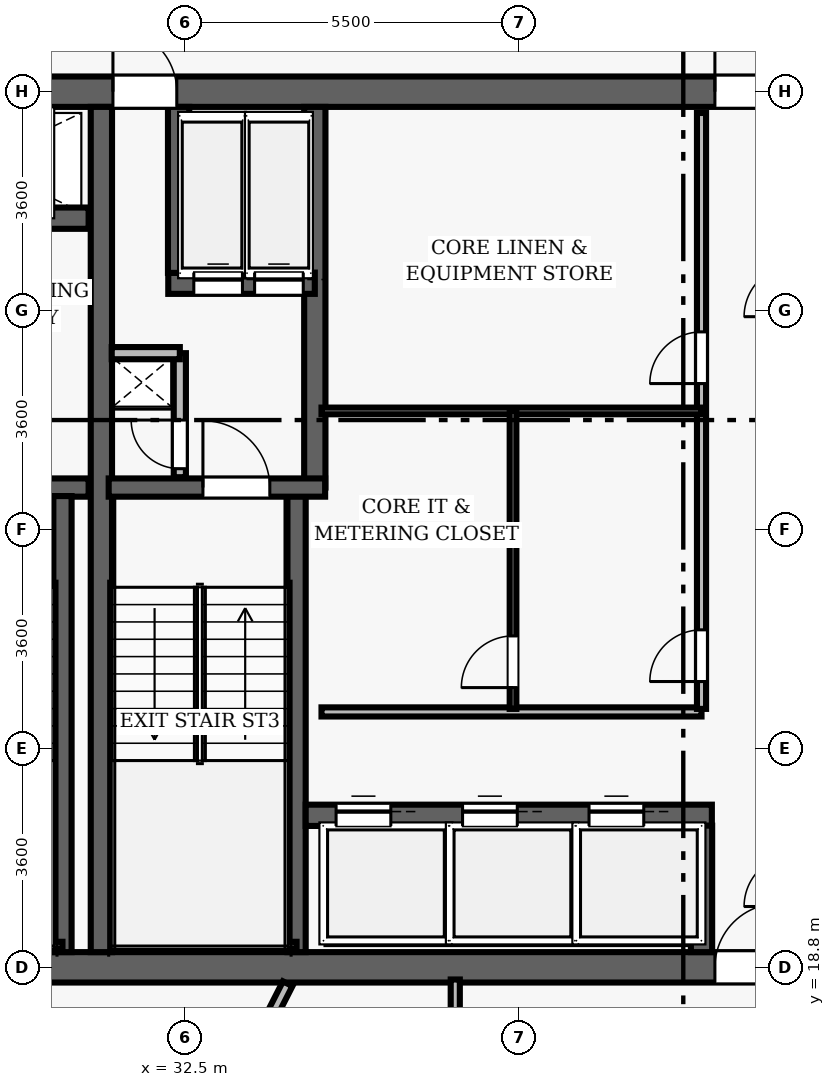
"""IFC4 building model, lengths in metres.
Left out: names, types, materials, properties, quantities, classifications, styles, units other than length and angle.
Written with IfcOpenShell. Run it as: python <this file> out.ifc"""

import sys

from ifc_helpers import new_model, si_unit, direction, frame, frame_2d, origin, place, context, subcontext, project, spatial, rectangle, extrude, element, fill, save


model = new_model("IFC4")
c1 = context("Model", 3, precision=1e-05, world=origin(), true_north=direction((0.0, 1.0)))
c2 = subcontext(c1, "Body", "Model", "MODEL_VIEW")
j1 = project(units=[si_unit("LENGTHUNIT", "METRE"), si_unit("PLANEANGLEUNIT", "RADIAN")], contexts=[c1])
p1 = place(None, origin())
s1 = spatial("IfcSite", under=j1, at=p1, CompositionType="ELEMENT")
p2 = place(p1, origin())
s2 = spatial("IfcBuilding", under=s1, at=p2, CompositionType="ELEMENT")
p3 = place(p2, frame((0.0, 0.0, 171.2)))
s3 = spatial("IfcBuildingStorey", under=s2, at=p3, CompositionType="ELEMENT", Elevation=171.2)
p4 = place(p3, frame((26.75, 18.8, 0.0), z_axis=(0.0, 0.0, 1.0), x_axis=(1.0, 0.0, 0.0)))
e1 = element("IfcWall", 1, at=p4, inside=s3, PredefinedType="SHEAR", context=c2, shape_type="SweptSolid", body=[
    extrude(rectangle(XDim=22.5, YDim=0.5, at=frame_2d((11.25, 0.0))), origin(), (0.0, 0.0, 1.0), 3.85),
])
p5 = place(p4, frame((14.47, 0.0, 0.0)))
e2 = element("IfcOpeningElement", 2, at=p5, cuts=e1, PredefinedType="OPENING", context=c2, shape_type="SweptSolid", body=[
    extrude(rectangle(XDim=1.05, YDim=2.15, at=frame_2d((0.525, 1.075))), frame((0.0, 0.26, 0.0), z_axis=(0.0, -1.0, 0.0), x_axis=(1.0, 0.0, 0.0)), (0.0, 0.0, 1.0), 0.52),
])
p6 = place(p3, frame((26.75, 33.2, 0.0), z_axis=(0.0, 0.0, 1.0), x_axis=(1.0, 0.0, 0.0)))
e3 = element("IfcWall", 3, at=p6, inside=s3, PredefinedType="SHEAR", context=c2, shape_type="SweptSolid", body=[
    extrude(rectangle(XDim=22.5, YDim=0.5, at=frame_2d((11.25, 0.0))), origin(), (0.0, 0.0, 1.0), 3.85),
])
p7 = place(p6, frame((4.57, 0.0, 0.0)))
e4 = element("IfcOpeningElement", 4, at=p7, cuts=e3, PredefinedType="OPENING", context=c2, shape_type="SweptSolid", body=[
    extrude(rectangle(XDim=1.05, YDim=2.15, at=frame_2d((0.525, 1.075))), frame((0.0, 0.26, 0.0), z_axis=(0.0, -1.0, 0.0), x_axis=(1.0, 0.0, 0.0)), (0.0, 0.0, 1.0), 0.52),
])
p8 = place(p6, frame((14.47, 0.0, 0.0)))
e5 = element("IfcOpeningElement", 5, at=p8, cuts=e3, PredefinedType="OPENING", context=c2, shape_type="SweptSolid", body=[
    extrude(rectangle(XDim=1.05, YDim=2.15, at=frame_2d((0.525, 1.075))), frame((0.0, 0.26, 0.0), z_axis=(0.0, -1.0, 0.0), x_axis=(1.0, 0.0, 0.0)), (0.0, 0.0, 1.0), 0.52),
])
p9 = place(p3, frame((31.13, 19.05, 0.0), z_axis=(0.0, 0.0, 1.0), x_axis=(0.0, 1.0, 0.0)))
e6 = element("IfcWall", 6, at=p9, inside=s3, PredefinedType="SHEAR", context=c2, shape_type="SweptSolid", body=[
    extrude(rectangle(XDim=13.9, YDim=0.35, at=frame_2d((6.95, 0.0))), origin(), (0.0, 0.0, 1.0), 3.85),
])
p10 = place(p3, frame((27.25, 26.69, 0.0), z_axis=(0.0, 0.0, 1.0), x_axis=(1.0, 0.0, 0.0)))
e7 = element("IfcWall", 7, at=p10, inside=s3, PredefinedType="SHEAR", context=c2, shape_type="SweptSolid", body=[
    extrude(rectangle(XDim=3.67, YDim=0.3, at=frame_2d((1.835, 0.0))), origin(), (0.0, 0.0, 1.0), 3.85),
])
p11 = place(p10, frame((1.05, 0.0, 0.0)))
e8 = element("IfcOpeningElement", 8, at=p11, cuts=e7, PredefinedType="OPENING", context=c2, shape_type="SweptSolid", body=[
    extrude(rectangle(XDim=1.1, YDim=2.15, at=frame_2d((0.55, 1.075))), frame((0.0, 0.16, 0.0), z_axis=(0.0, -1.0, 0.0), x_axis=(1.0, 0.0, 0.0)), (0.0, 0.0, 1.0), 0.32),
])
p12 = place(p3, frame((30.49, 19.05, 0.0), z_axis=(0.0, 0.0, 1.0), x_axis=(0.0, 1.0, 0.0)))
e9 = element("IfcWall", 9, at=p12, inside=s3, PredefinedType="SHEAR", context=c2, shape_type="SweptSolid", body=[
    extrude(rectangle(XDim=7.5, YDim=0.3, at=frame_2d((3.75, 0.0))), origin(), (0.0, 0.0, 1.0), 3.85),
])
p13 = place(p3, frame((27.395, 19.16, 0.0), z_axis=(0.0, 0.0, 1.0), x_axis=(1.0, 0.0, 0.0)))
e10 = element("IfcWall", 10, at=p13, inside=s3, PredefinedType="SHEAR", context=c2, shape_type="SweptSolid", body=[
    extrude(rectangle(XDim=3.095, YDim=0.12, at=frame_2d((1.547, 0.0))), origin(), (0.0, 0.0, 1.0), 3.85),
])
p14 = place(p3, frame((27.25, 31.12, 0.0), z_axis=(0.0, 0.0, 1.0), x_axis=(1.0, 0.0, 0.0)))
e11 = element("IfcWall", 11, at=p14, inside=s3, PredefinedType="SHEAR", context=c2, shape_type="SweptSolid", body=[
    extrude(rectangle(XDim=3.67, YDim=0.35, at=frame_2d((1.835, 0.0))), origin(), (0.0, 0.0, 1.0), 3.035),
])
p15 = place(p14, frame((1.25, 0.0, 0.0)))
e12 = element("IfcOpeningElement", 12, at=p15, cuts=e11, PredefinedType="OPENING", context=c2, shape_type="SweptSolid", body=[
    extrude(rectangle(XDim=1.1, YDim=2.15, at=frame_2d((0.55, 1.075))), frame((0.0, 0.185, 0.0), z_axis=(0.0, -1.0, 0.0), x_axis=(1.0, 0.0, 0.0)), (0.0, 0.0, 1.0), 0.37),
])
p16 = place(p3, frame((34.34, 19.05, 0.0), z_axis=(0.0, 0.0, 1.0), x_axis=(0.0, 1.0, 0.0)))
e13 = element("IfcWall", 13, at=p16, inside=s3, PredefinedType="SHEAR", context=c2, shape_type="SweptSolid", body=[
    extrude(rectangle(XDim=7.5, YDim=0.3, at=frame_2d((3.75, 0.0))), origin(), (0.0, 0.0, 1.0), 3.85),
])
p17 = place(p3, frame((34.64, 26.69, 0.0), z_axis=(0.0, 0.0, 1.0), x_axis=(0.0, 1.0, 0.0)))
e14 = element("IfcWall", 14, at=p17, inside=s3, PredefinedType="SHEAR", context=c2, shape_type="SweptSolid", body=[
    extrude(rectangle(XDim=6.26, YDim=0.35, at=frame_2d((3.13, 0.0))), origin(), (0.0, 0.0, 1.0), 3.85),
])
p18 = place(p3, frame((31.25, 26.69, 0.0), z_axis=(0.0, 0.0, 1.0), x_axis=(1.0, 0.0, 0.0)))
e15 = element("IfcWall", 15, at=p18, inside=s3, PredefinedType="SHEAR", context=c2, shape_type="SweptSolid", body=[
    extrude(rectangle(XDim=3.56, YDim=0.3, at=frame_2d((1.78, 0.0))), origin(), (0.0, 0.0, 1.0), 3.85),
])
p19 = place(p18, frame((1.55, 0.0, 0.0)))
e16 = element("IfcOpeningElement", 16, at=p19, cuts=e15, PredefinedType="OPENING", context=c2, shape_type="SweptSolid", body=[
    extrude(rectangle(XDim=1.1, YDim=2.15, at=frame_2d((0.55, 1.075))), frame((0.0, 0.16, 0.0), z_axis=(0.0, -1.0, 0.0), x_axis=(1.0, 0.0, 0.0)), (0.0, 0.0, 1.0), 0.32),
])
p20 = place(p3, frame((31.3, 19.16, 0.0), z_axis=(0.0, 0.0, 1.0), x_axis=(1.0, 0.0, 0.0)))
e17 = element("IfcWall", 17, at=p20, inside=s3, PredefinedType="SHEAR", context=c2, shape_type="SweptSolid", body=[
    extrude(rectangle(XDim=3.04, YDim=0.12, at=frame_2d((1.52, 0.0))), origin(), (0.0, 0.0, 1.0), 3.85),
])
p21 = place(p3, frame((32.23, 30.05, 0.0), z_axis=(0.0, 0.0, 1.0), x_axis=(1.0, 0.0, 0.0)))
e18 = element("IfcWall", 18, at=p21, inside=s3, PredefinedType="SHEAR", context=c2, shape_type="SweptSolid", body=[
    extrude(rectangle(XDim=2.41, YDim=0.35, at=frame_2d((1.205, 0.0))), origin(), (0.0, 0.0, 1.0), 3.035),
])
p22 = place(p21, frame((0.42, 0.0, 0.0)))
e19 = element("IfcOpeningElement", 19, at=p22, cuts=e18, PredefinedType="OPENING", context=c2, shape_type="SweptSolid", body=[
    extrude(rectangle(XDim=0.8, YDim=2.15, at=frame_2d((0.4, 1.075))), frame((0.0, 0.185, 0.0), z_axis=(0.0, -1.0, 0.0), x_axis=(1.0, 0.0, 0.0)), (0.0, 0.0, 1.0), 0.37),
])
p23 = place(p21, frame((1.42, 0.0, 0.0)))
e20 = element("IfcOpeningElement", 20, at=p23, cuts=e18, PredefinedType="OPENING", context=c2, shape_type="SweptSolid", body=[
    extrude(rectangle(XDim=0.8, YDim=2.15, at=frame_2d((0.4, 1.075))), frame((0.0, 0.185, 0.0), z_axis=(0.0, -1.0, 0.0), x_axis=(1.0, 0.0, 0.0)), (0.0, 0.0, 1.0), 0.37),
])
p24 = place(p3, frame((32.4, 30.22, 0.0), z_axis=(0.0, 0.0, 1.0), x_axis=(0.0, 1.0, 0.0)))
e21 = element("IfcWall", 21, at=p24, inside=s3, PredefinedType="SHEAR", context=c2, shape_type="SweptSolid", body=[
    extrude(rectangle(XDim=2.73, YDim=0.35, at=frame_2d((1.365, 0.0))), origin(), (0.0, 0.0, 1.0), 3.035),
])
p25 = place(p3, frame((32.42, 26.86, 0.0), z_axis=(0.0, 0.0, 1.0), x_axis=(0.0, 1.0, 0.0)))
e22 = element("IfcWall", 22, at=p25, inside=s3, PredefinedType="PARTITIONING", context=c2, shape_type="SweptSolid", body=[
    extrude(rectangle(XDim=2.04, YDim=0.2, at=frame_2d((1.02, 0.0))), origin(), (0.0, 0.0, 1.0), 3.035),
])
p26 = place(p25, frame((0.14, 0.0, 0.0)))
e23 = element("IfcOpeningElement", 23, at=p26, cuts=e22, PredefinedType="OPENING", context=c2, shape_type="SweptSolid", body=[
    extrude(rectangle(XDim=0.8, YDim=2.05, at=frame_2d((0.4, 1.025))), frame((0.0, 0.11, 0.0), z_axis=(0.0, -1.0, 0.0), x_axis=(1.0, 0.0, 0.0)), (0.0, 0.0, 1.0), 0.22),
])
p27 = place(p3, frame((31.3, 28.9, 0.0), z_axis=(0.0, 0.0, 1.0), x_axis=(1.0, 0.0, 0.0)))
e24 = element("IfcWall", 24, at=p27, inside=s3, PredefinedType="PARTITIONING", context=c2, shape_type="SweptSolid", body=[
    extrude(rectangle(XDim=1.12, YDim=0.2, at=frame_2d((0.56, 0.0))), origin(), (0.0, 0.0, 1.0), 3.035),
])
p28 = place(p3, frame((34.49, 21.3, 0.0), z_axis=(0.0, 0.0, 1.0), x_axis=(1.0, 0.0, 0.0)))
e25 = element("IfcWall", 25, at=p28, inside=s3, PredefinedType="SHEAR", context=c2, shape_type="SweptSolid", body=[
    extrude(rectangle(XDim=6.68, YDim=0.35, at=frame_2d((3.34, 0.0))), origin(), (0.0, 0.0, 1.0), 3.035),
])
p29 = place(p28, frame((0.5, 0.0, 0.0)))
e26 = element("IfcOpeningElement", 26, at=p29, cuts=e25, PredefinedType="OPENING", context=c2, shape_type="SweptSolid", body=[
    extrude(rectangle(XDim=0.9, YDim=2.15, at=frame_2d((0.45, 1.075))), frame((0.0, 0.185, 0.0), z_axis=(0.0, -1.0, 0.0), x_axis=(1.0, 0.0, 0.0)), (0.0, 0.0, 1.0), 0.37),
])
p30 = place(p28, frame((2.58, 0.0, 0.0)))
e27 = element("IfcOpeningElement", 27, at=p30, cuts=e25, PredefinedType="OPENING", context=c2, shape_type="SweptSolid", body=[
    extrude(rectangle(XDim=0.9, YDim=2.15, at=frame_2d((0.45, 1.075))), frame((0.0, 0.185, 0.0), z_axis=(0.0, -1.0, 0.0), x_axis=(1.0, 0.0, 0.0)), (0.0, 0.0, 1.0), 0.37),
])
p31 = place(p28, frame((4.66, 0.0, 0.0)))
e28 = element("IfcOpeningElement", 28, at=p31, cuts=e25, PredefinedType="OPENING", context=c2, shape_type="SweptSolid", body=[
    extrude(rectangle(XDim=0.9, YDim=2.15, at=frame_2d((0.45, 1.075))), frame((0.0, 0.185, 0.0), z_axis=(0.0, -1.0, 0.0), x_axis=(1.0, 0.0, 0.0)), (0.0, 0.0, 1.0), 0.37),
])
p32 = place(p3, frame((41.0, 19.05, 0.0), z_axis=(0.0, 0.0, 1.0), x_axis=(0.0, 1.0, 0.0)))
e29 = element("IfcWall", 29, at=p32, inside=s3, PredefinedType="SHEAR", context=c2, shape_type="SweptSolid", body=[
    extrude(rectangle(XDim=2.08, YDim=0.35, at=frame_2d((1.04, 0.0))), origin(), (0.0, 0.0, 1.0), 3.035),
])
p33 = place(p3, frame((34.75, 23.0, 0.0), z_axis=(0.0, 0.0, 1.0), x_axis=(1.0, 0.0, 0.0)))
e30 = element("IfcWall", 30, at=p33, inside=s3, PredefinedType="PARTITIONING", context=c2, shape_type="SweptSolid", body=[
    extrude(rectangle(XDim=6.25, YDim=0.15, at=frame_2d((3.125, 0.0))), origin(), (0.0, 0.0, 1.0), 3.035),
])
p34 = place(p3, frame((41.0, 23.05, 0.0), z_axis=(0.0, 0.0, 1.0), x_axis=(0.0, 1.0, 0.0)))
e31 = element("IfcWall", 31, at=p34, inside=s3, PredefinedType="PARTITIONING", context=c2, shape_type="SweptSolid", body=[
    extrude(rectangle(XDim=9.8, YDim=0.15, at=frame_2d((4.9, 0.0))), origin(), (0.0, 0.0, 1.0), 3.035),
])
p35 = place(p34, frame((5.35, 0.0, 0.0)))
e32 = element("IfcOpeningElement", 32, at=p35, cuts=e31, PredefinedType="OPENING", context=c2, shape_type="SweptSolid", body=[
    extrude(rectangle(XDim=0.85, YDim=2.1, at=frame_2d((0.425, 1.05))), frame((0.0, 0.085, 0.0), z_axis=(0.0, -1.0, 0.0), x_axis=(1.0, 0.0, 0.0)), (0.0, 0.0, 1.0), 0.17),
])
p36 = place(p34, frame((0.45, 0.0, 0.0)))
e33 = element("IfcOpeningElement", 33, at=p36, cuts=e31, PredefinedType="OPENING", context=c2, shape_type="SweptSolid", body=[
    extrude(rectangle(XDim=0.85, YDim=2.1, at=frame_2d((0.425, 1.05))), frame((0.0, 0.085, 0.0), z_axis=(0.0, -1.0, 0.0), x_axis=(1.0, 0.0, 0.0)), (0.0, 0.0, 1.0), 0.17),
])
p37 = place(p3, frame((34.75, 27.95, 0.0), z_axis=(0.0, 0.0, 1.0), x_axis=(1.0, 0.0, 0.0)))
e34 = element("IfcWall", 34, at=p37, inside=s3, PredefinedType="PARTITIONING", context=c2, shape_type="SweptSolid", body=[
    extrude(rectangle(XDim=6.25, YDim=0.11, at=frame_2d((3.125, 0.0))), origin(), (0.0, 0.0, 1.0), 3.035),
])
p38 = place(p3, frame((37.9, 23.05, 0.0), z_axis=(0.0, 0.0, 1.0), x_axis=(0.0, 1.0, 0.0)))
e35 = element("IfcWall", 35, at=p38, inside=s3, PredefinedType="PARTITIONING", context=c2, shape_type="SweptSolid", body=[
    extrude(rectangle(XDim=4.9, YDim=0.11, at=frame_2d((2.45, 0.0))), origin(), (0.0, 0.0, 1.0), 3.035),
])
p39 = place(p38, frame((0.35, 0.0, 0.0)))
e36 = element("IfcOpeningElement", 36, at=p39, cuts=e35, PredefinedType="OPENING", context=c2, shape_type="SweptSolid", body=[
    extrude(rectangle(XDim=0.85, YDim=2.1, at=frame_2d((0.425, 1.05))), frame((0.0, 0.065, 0.0), z_axis=(0.0, -1.0, 0.0), x_axis=(1.0, 0.0, 0.0)), (0.0, 0.0, 1.0), 0.13),
])
p40 = place(p3, frame((36.95, 11.2, 0.0), z_axis=(0.0, 0.0, 1.0), x_axis=(0.0, 1.0, 0.0)))
e37 = element("IfcWall", 37, at=p40, inside=s3, PredefinedType="PARTITIONING", context=c2, shape_type="SweptSolid", body=[
    extrude(rectangle(XDim=7.4, YDim=0.15, at=frame_2d((3.7, 0.0))), origin(), (0.0, 0.0, 1.0), 3.035),
])
p41 = place(p40, frame((5.075, 0.0, 0.0)))
e38 = element("IfcOpeningElement", 38, at=p41, cuts=e37, PredefinedType="OPENING", context=c2, shape_type="SweptSolid", body=[
    extrude(rectangle(XDim=0.95, YDim=2.15, at=frame_2d((0.475, 1.075))), frame((0.0, 0.085, 0.0), z_axis=(0.0, -1.0, 0.0), x_axis=(1.0, 0.0, 0.0)), (0.0, 0.0, 1.0), 0.17),
])
p42 = place(p3, frame((34.194, 18.53, 0.0), z_axis=(0.0, 0.0, 1.0), x_axis=(-0.453989957323, -0.891006800563, 0.0)))
e39 = element("IfcWall", 39, at=p42, inside=s3, PredefinedType="PARTITIONING", context=c2, shape_type="SweptSolid", body=[
    extrude(rectangle(XDim=13.449, YDim=0.175, at=frame_2d((6.725, 0.0))), origin(), (0.0, 0.0, 1.0), 3.035),
])
p43 = place(p19, origin())
e40 = element("IfcDoor", 40, at=p43, inside=s3, OperationType="SINGLE_SWING_LEFT", PredefinedType="DOOR", context=c2, shape_type="SweptSolid", body=[
    extrude(rectangle(XDim=1.1, YDim=2.15, at=frame_2d((0.55, 1.075))), frame((0.0, 0.025, 0.0), z_axis=(0.0, -1.0, 0.0), x_axis=(1.0, 0.0, 0.0)), (0.0, 0.0, 1.0), 0.05),
])
fill(e16, e40)
p44 = place(p26, origin())
e41 = element("IfcDoor", 41, at=p44, inside=s3, OperationType="SINGLE_SWING_RIGHT", PredefinedType="DOOR", context=c2, shape_type="SweptSolid", body=[
    extrude(rectangle(XDim=0.8, YDim=2.05, at=frame_2d((0.4, 1.025))), frame((0.0, 0.025, 0.0), z_axis=(0.0, -1.0, 0.0), x_axis=(1.0, 0.0, 0.0)), (0.0, 0.0, 1.0), 0.05),
])
fill(e23, e41)
p45 = place(p7, origin())
e42 = element("IfcDoor", 42, at=p45, inside=s3, OperationType="SINGLE_SWING_LEFT", PredefinedType="DOOR", context=c2, shape_type="SweptSolid", body=[
    extrude(rectangle(XDim=1.05, YDim=2.15, at=frame_2d((0.525, 1.075))), frame((0.0, 0.025, 0.0), z_axis=(0.0, -1.0, 0.0), x_axis=(1.0, 0.0, 0.0)), (0.0, 0.0, 1.0), 0.05),
])
fill(e4, e42)
p46 = place(p8, origin())
e43 = element("IfcDoor", 43, at=p46, inside=s3, OperationType="SINGLE_SWING_LEFT", PredefinedType="DOOR", context=c2, shape_type="SweptSolid", body=[
    extrude(rectangle(XDim=1.05, YDim=2.15, at=frame_2d((0.525, 1.075))), frame((0.0, 0.025, 0.0), z_axis=(0.0, -1.0, 0.0), x_axis=(1.0, 0.0, 0.0)), (0.0, 0.0, 1.0), 0.05),
])
fill(e5, e43)
p47 = place(p5, origin())
e44 = element("IfcDoor", 44, at=p47, inside=s3, OperationType="SINGLE_SWING_RIGHT", PredefinedType="DOOR", context=c2, shape_type="SweptSolid", body=[
    extrude(rectangle(XDim=1.05, YDim=2.15, at=frame_2d((0.525, 1.075))), frame((0.0, 0.025, 0.0), z_axis=(0.0, -1.0, 0.0), x_axis=(1.0, 0.0, 0.0)), (0.0, 0.0, 1.0), 0.05),
])
fill(e2, e44)
p48 = place(p35, origin())
e45 = element("IfcDoor", 45, at=p48, inside=s3, OperationType="SINGLE_SWING_LEFT", PredefinedType="DOOR", context=c2, shape_type="SweptSolid", body=[
    extrude(rectangle(XDim=0.85, YDim=2.1, at=frame_2d((0.425, 1.05))), frame((0.0, 0.025, 0.0), z_axis=(0.0, -1.0, 0.0), x_axis=(1.0, 0.0, 0.0)), (0.0, 0.0, 1.0), 0.05),
])
fill(e32, e45)
p49 = place(p36, origin())
e46 = element("IfcDoor", 46, at=p49, inside=s3, OperationType="SINGLE_SWING_LEFT", PredefinedType="DOOR", context=c2, shape_type="SweptSolid", body=[
    extrude(rectangle(XDim=0.85, YDim=2.1, at=frame_2d((0.425, 1.05))), frame((0.0, 0.025, 0.0), z_axis=(0.0, -1.0, 0.0), x_axis=(1.0, 0.0, 0.0)), (0.0, 0.0, 1.0), 0.05),
])
fill(e33, e46)
p50 = place(p39, origin())
e47 = element("IfcDoor", 47, at=p50, inside=s3, OperationType="SINGLE_SWING_LEFT", PredefinedType="DOOR", context=c2, shape_type="SweptSolid", body=[
    extrude(rectangle(XDim=0.85, YDim=2.1, at=frame_2d((0.425, 1.05))), frame((0.0, 0.025, 0.0), z_axis=(0.0, -1.0, 0.0), x_axis=(1.0, 0.0, 0.0)), (0.0, 0.0, 1.0), 0.05),
])
fill(e36, e47)
p51 = place(p29, origin())
e48 = element("IfcDoor", 48, at=p51, inside=s3, OperationType="SLIDING_TO_LEFT", PredefinedType="DOOR", context=c2, shape_type="SweptSolid", body=[
    extrude(rectangle(XDim=0.9, YDim=2.15, at=frame_2d((0.45, 1.075))), frame((0.0, 0.025, 0.0), z_axis=(0.0, -1.0, 0.0), x_axis=(1.0, 0.0, 0.0)), (0.0, 0.0, 1.0), 0.05),
])
fill(e26, e48)
p52 = place(p30, origin())
e49 = element("IfcDoor", 49, at=p52, inside=s3, OperationType="SLIDING_TO_LEFT", PredefinedType="DOOR", context=c2, shape_type="SweptSolid", body=[
    extrude(rectangle(XDim=0.9, YDim=2.15, at=frame_2d((0.45, 1.075))), frame((0.0, 0.025, 0.0), z_axis=(0.0, -1.0, 0.0), x_axis=(1.0, 0.0, 0.0)), (0.0, 0.0, 1.0), 0.05),
])
fill(e27, e49)
p53 = place(p31, origin())
e50 = element("IfcDoor", 50, at=p53, inside=s3, OperationType="SLIDING_TO_LEFT", PredefinedType="DOOR", context=c2, shape_type="SweptSolid", body=[
    extrude(rectangle(XDim=0.9, YDim=2.15, at=frame_2d((0.45, 1.075))), frame((0.0, 0.025, 0.0), z_axis=(0.0, -1.0, 0.0), x_axis=(1.0, 0.0, 0.0)), (0.0, 0.0, 1.0), 0.05),
])
fill(e28, e50)
p54 = place(p22, origin())
e51 = element("IfcDoor", 51, at=p54, inside=s3, OperationType="SLIDING_TO_LEFT", PredefinedType="DOOR", context=c2, shape_type="SweptSolid", body=[
    extrude(rectangle(XDim=0.8, YDim=2.15, at=frame_2d((0.4, 1.075))), frame((0.0, 0.025, 0.0), z_axis=(0.0, -1.0, 0.0), x_axis=(1.0, 0.0, 0.0)), (0.0, 0.0, 1.0), 0.05),
])
fill(e19, e51)
p55 = place(p23, origin())
e52 = element("IfcDoor", 52, at=p55, inside=s3, OperationType="SLIDING_TO_LEFT", PredefinedType="DOOR", context=c2, shape_type="SweptSolid", body=[
    extrude(rectangle(XDim=0.8, YDim=2.15, at=frame_2d((0.4, 1.075))), frame((0.0, 0.025, 0.0), z_axis=(0.0, -1.0, 0.0), x_axis=(1.0, 0.0, 0.0)), (0.0, 0.0, 1.0), 0.05),
])
fill(e20, e52)
save(model, sys.argv[1])
